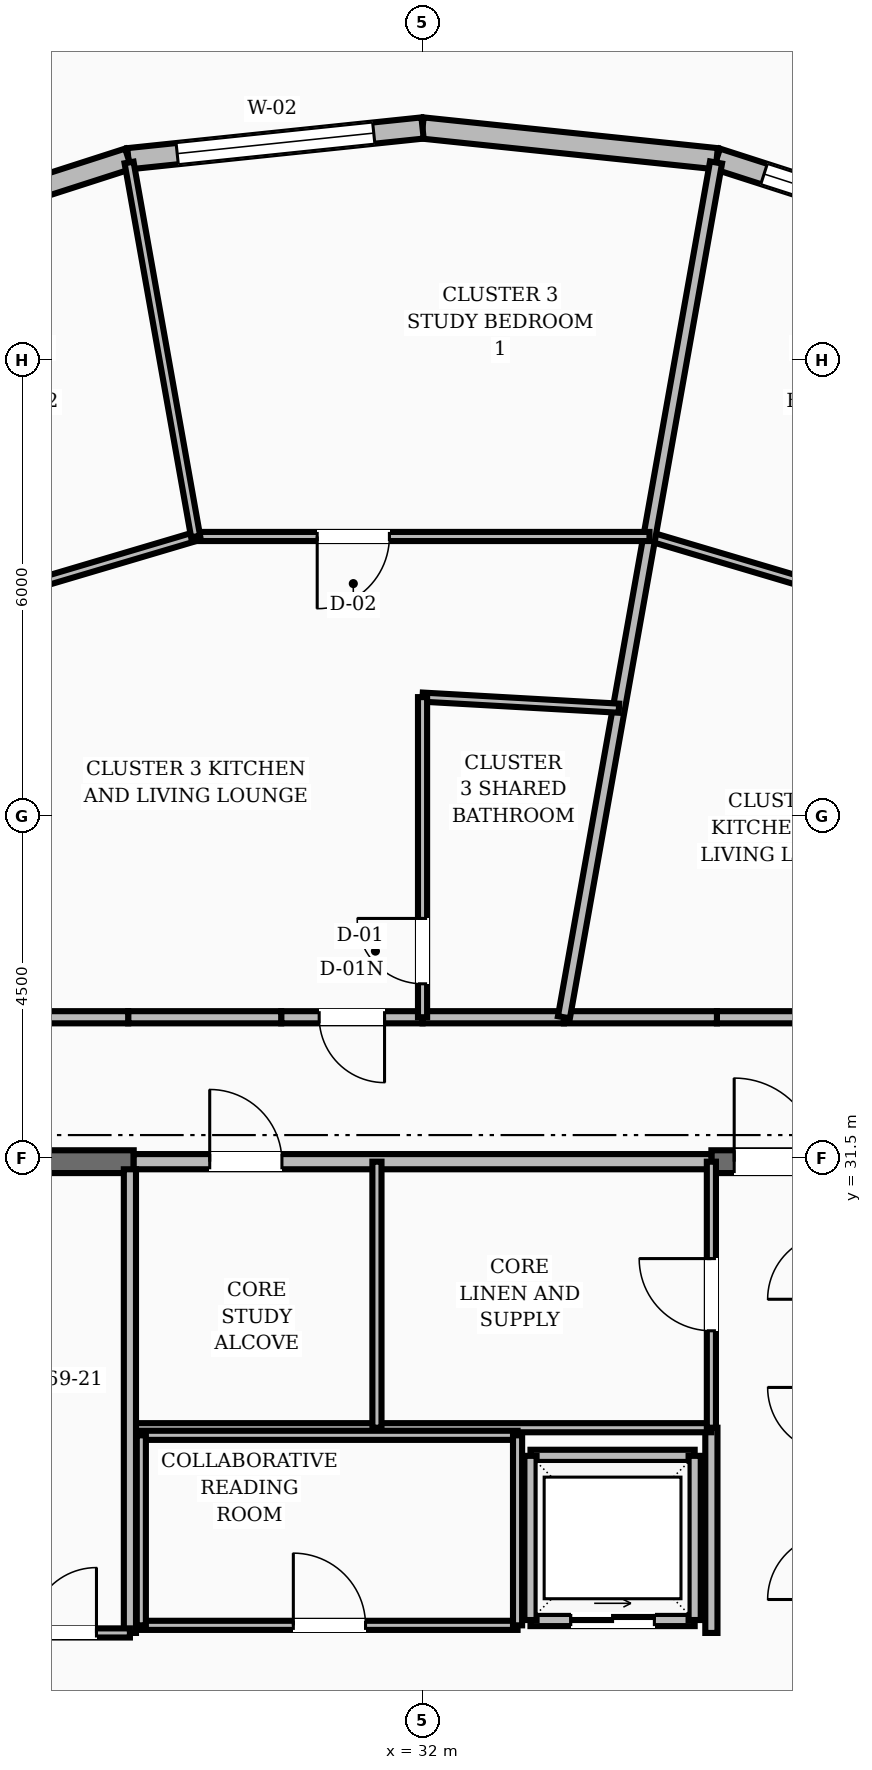
"""IFC4 building model, lengths in metres.
Left out: names, types, materials, properties, quantities, classifications, styles, units other than length and angle.
Written with IfcOpenShell. Run it as: python <this file> out.ifc"""

import sys

from ifc_helpers import new_model, si_unit, direction, frame, frame_2d, origin, place, context, subcontext, project, spatial, rectangle, extrude, element, fill, save


model = new_model("IFC4")
c1 = context("Model", 3, precision=1e-05, world=origin(), true_north=direction((0.0, 1.0)))
c2 = subcontext(c1, "Body", "Model", "MODEL_VIEW")
j1 = project(units=[si_unit("LENGTHUNIT", "METRE"), si_unit("PLANEANGLEUNIT", "RADIAN")], contexts=[c1])
p1 = place(None, origin())
s1 = spatial("IfcSite", under=j1, at=p1, CompositionType="ELEMENT")
p2 = place(p1, origin())
s2 = spatial("IfcBuilding", under=s1, at=p2, CompositionType="ELEMENT")
p3 = place(p2, frame((0.0, 0.0, 265.2)))
s3 = spatial("IfcBuildingStorey", under=s2, at=p3, CompositionType="ELEMENT", Elevation=265.2)
p4 = place(p3, frame((24.95, 31.45, 0.0), z_axis=(0.0, 0.0, 1.0), x_axis=(1.0, 0.0, 0.0)))
e1 = element("IfcWall", 1, at=p4, inside=s3, PredefinedType="SHEAR", context=c2, shape_type="SweptSolid", body=[
    extrude(rectangle(XDim=3.25, YDim=0.3, at=frame_2d((1.625, 0.0))), origin(), (0.0, 0.0, 1.0), 3.6),
])
p5 = place(p3, frame((35.8, 31.45, 0.0), z_axis=(0.0, 0.0, 1.0), x_axis=(1.0, 0.0, 0.0)))
e2 = element("IfcWall", 2, at=p5, inside=s3, PredefinedType="SHEAR", context=c2, shape_type="SweptSolid", body=[
    extrude(rectangle(XDim=3.25, YDim=0.3, at=frame_2d((1.625, 0.0))), origin(), (0.0, 0.0, 1.0), 3.6),
])
p6 = place(p5, frame((0.3, 0.0, 0.0)))
e3 = element("IfcOpeningElement", 3, at=p6, cuts=e2, PredefinedType="OPENING", context=c2, shape_type="SweptSolid", body=[
    extrude(rectangle(XDim=1.1, YDim=2.1, at=frame_2d((0.55, 1.05))), frame((0.0, 0.16, 0.0), z_axis=(0.0, -1.0, 0.0), x_axis=(1.0, 0.0, 0.0)), (0.0, 0.0, 1.0), 0.32),
])
p7 = place(p3, frame((39.591, 43.447, 0.0), z_axis=(0.0, 0.0, 1.0), x_axis=(-0.951905022268, 0.306393258053, 0.0)))
e4 = element("IfcWall", 4, at=p7, inside=s3, PredefinedType="STANDARD", context=c2, shape_type="SweptSolid", body=[
    extrude(rectangle(XDim=3.909, YDim=0.28, at=frame_2d((1.955, 0.0))), origin(), (0.0, 0.0, 1.0), 2.88),
])
p8 = place(p7, frame((0.655, 0.0, 0.8)))
e5 = element("IfcOpeningElement", 5, at=p8, cuts=e4, PredefinedType="OPENING", context=c2, shape_type="SweptSolid", body=[
    extrude(rectangle(XDim=2.6, YDim=1.65, at=frame_2d((1.3, 0.825))), frame((0.0, 0.15, 0.0), z_axis=(0.0, -1.0, 0.0), x_axis=(1.0, 0.0, 0.0)), (0.0, 0.0, 1.0), 0.3),
])
p9 = place(p3, frame((35.87, 44.645, 0.0), z_axis=(0.0, 0.0, 1.0), x_axis=(-0.9945804904, 0.103969457611, 0.0)))
e6 = element("IfcWall", 6, at=p9, inside=s3, PredefinedType="STANDARD", context=c2, shape_type="SweptSolid", body=[
    extrude(rectangle(XDim=3.891, YDim=0.28, at=frame_2d((1.945, 0.0))), origin(), (0.0, 0.0, 1.0), 2.88),
])
p10 = place(p3, frame((32.0, 45.049, 0.0), z_axis=(0.0, 0.0, 1.0), x_axis=(-0.9945804904, -0.103969457611, 0.0)))
e7 = element("IfcWall", 7, at=p10, inside=s3, PredefinedType="STANDARD", context=c2, shape_type="SweptSolid", body=[
    extrude(rectangle(XDim=3.891, YDim=0.28, at=frame_2d((1.945, 0.0))), origin(), (0.0, 0.0, 1.0), 2.88),
])
p11 = place(p10, frame((0.646, 0.0, 0.8)))
e8 = element("IfcOpeningElement", 8, at=p11, cuts=e7, PredefinedType="OPENING", context=c2, shape_type="SweptSolid", body=[
    extrude(rectangle(XDim=2.6, YDim=1.65, at=frame_2d((1.3, 0.825))), frame((0.0, 0.15, 0.0), z_axis=(0.0, -1.0, 0.0), x_axis=(1.0, 0.0, 0.0)), (0.0, 0.0, 1.0), 0.3),
])
p12 = place(p3, frame((28.13, 44.645, 0.0), z_axis=(0.0, 0.0, 1.0), x_axis=(-0.951905022268, -0.306393258053, 0.0)))
e9 = element("IfcWall", 9, at=p12, inside=s3, PredefinedType="STANDARD", context=c2, shape_type="SweptSolid", body=[
    extrude(rectangle(XDim=3.909, YDim=0.28, at=frame_2d((1.955, 0.0))), origin(), (0.0, 0.0, 1.0), 2.88),
])
p13 = place(p3, frame((35.8, 25.25, 0.0), z_axis=(0.0, 0.0, 1.0), x_axis=(0.0, 1.0, 0.0)))
e10 = element("IfcWall", 10, at=p13, inside=s3, PredefinedType="SOLIDWALL", context=c2, shape_type="SweptSolid", body=[
    extrude(rectangle(XDim=2.7, YDim=0.16, at=frame_2d((1.35, 0.0))), origin(), (0.0, 0.0, 1.0), 2.87),
])
p14 = place(p3, frame((33.42, 25.42, 0.0), z_axis=(0.0, 0.0, 1.0), x_axis=(1.0, 0.0, 0.0)))
e11 = element("IfcWall", 11, at=p14, inside=s3, PredefinedType="SOLIDWALL", context=c2, shape_type="SweptSolid", body=[
    extrude(rectangle(XDim=2.16, YDim=0.16, at=frame_2d((1.08, 0.0))), origin(), (0.0, 0.0, 1.0), 2.87),
])
p15 = place(p14, frame((0.53, 0.0, 0.0)))
e12 = element("IfcOpeningElement", 12, at=p15, cuts=e11, PredefinedType="OPENING", context=c2, shape_type="SweptSolid", body=[
    extrude(rectangle(XDim=1.1, YDim=2.15, at=frame_2d((0.55, 1.075))), frame((0.0, 0.09, 0.0), z_axis=(0.0, -1.0, 0.0), x_axis=(1.0, 0.0, 0.0)), (0.0, 0.0, 1.0), 0.18),
])
for number, where, z_axis, x_axis in (
    (13, (33.42, 27.58, 0.0), (0.0, 0.0, 1.0), (1.0, 0.0, 0.0)),
    (14, (33.42, 25.42, 0.0), (0.0, 0.0, 1.0), (0.0, 1.0, 0.0)),
    (15, (35.58, 25.42, 0.0), (0.0, 0.0, 1.0), (0.0, 1.0, 0.0)),
):
    element("IfcWall", number, at=place(p3, frame(where, z_axis=z_axis, x_axis=x_axis)), inside=s3, PredefinedType="SOLIDWALL", context=c2, shape_type="SweptSolid", body=[
        extrude(rectangle(XDim=2.16, YDim=0.16, at=frame_2d((1.08, 0.0))), origin(), (0.0, 0.0, 1.0), 2.87),
    ])
p16 = place(p3, frame((28.2, 31.45, 0.0), z_axis=(0.0, 0.0, 1.0), x_axis=(1.0, 0.0, 0.0)))
e16 = element("IfcWall", 16, at=p16, inside=s3, PredefinedType="SOLIDWALL", context=c2, shape_type="SweptSolid", body=[
    extrude(rectangle(XDim=7.6, YDim=0.2, at=frame_2d((3.8, 0.0))), origin(), (0.0, 0.0, 1.0), 2.87),
])
p17 = place(p16, frame((1.0, 0.0, 0.0)))
e17 = element("IfcOpeningElement", 17, at=p17, cuts=e16, PredefinedType="OPENING", context=c2, shape_type="SweptSolid", body=[
    extrude(rectangle(XDim=0.95, YDim=2.1, at=frame_2d((0.475, 1.05))), frame((0.0, 0.11, 0.0), z_axis=(0.0, -1.0, 0.0), x_axis=(1.0, 0.0, 0.0)), (0.0, 0.0, 1.0), 0.22),
])
p18 = place(p3, frame((28.2, 27.95, 0.0), z_axis=(0.0, 0.0, 1.0), x_axis=(1.0, 0.0, 0.0)))
e18 = element("IfcWall", 18, at=p18, inside=s3, PredefinedType="PARTITIONING", context=c2, shape_type="SweptSolid", body=[
    extrude(rectangle(XDim=7.6, YDim=0.12, at=frame_2d((3.8, 0.0))), origin(), (0.0, 0.0, 1.0), 2.87),
])
p19 = place(p3, frame((35.8, 27.95, 0.0), z_axis=(0.0, 0.0, 1.0), x_axis=(0.0, 1.0, 0.0)))
e19 = element("IfcWall", 19, at=p19, inside=s3, PredefinedType="PARTITIONING", context=c2, shape_type="SweptSolid", body=[
    extrude(rectangle(XDim=3.5, YDim=0.12, at=frame_2d((1.75, 0.0))), origin(), (0.0, 0.0, 1.0), 2.87),
])
p20 = place(p19, frame((1.275, 0.0, 0.0)))
e20 = element("IfcOpeningElement", 20, at=p20, cuts=e19, PredefinedType="OPENING", context=c2, shape_type="SweptSolid", body=[
    extrude(rectangle(XDim=0.95, YDim=2.1, at=frame_2d((0.475, 1.05))), frame((0.0, 0.07, 0.0), z_axis=(0.0, -1.0, 0.0), x_axis=(1.0, 0.0, 0.0)), (0.0, 0.0, 1.0), 0.14),
])
p21 = place(p3, frame((31.4, 27.95, 0.0), z_axis=(0.0, 0.0, 1.0), x_axis=(0.0, 1.0, 0.0)))
e21 = element("IfcWall", 21, at=p21, inside=s3, PredefinedType="PARTITIONING", context=c2, shape_type="SweptSolid", body=[
    extrude(rectangle(XDim=3.5, YDim=0.12, at=frame_2d((1.75, 0.0))), origin(), (0.0, 0.0, 1.0), 2.87),
])
p22 = place(p3, frame((28.3, 25.35, 0.0), z_axis=(0.0, 0.0, 1.0), x_axis=(1.0, 0.0, 0.0)))
e22 = element("IfcWall", 22, at=p22, inside=s3, PredefinedType="PARTITIONING", context=c2, shape_type="SweptSolid", body=[
    extrude(rectangle(XDim=4.95, YDim=0.12, at=frame_2d((2.475, 0.0))), origin(), (0.0, 0.0, 1.0), 2.87),
])
p23 = place(p22, frame((2.0, 0.0, 0.0)))
e23 = element("IfcOpeningElement", 23, at=p23, cuts=e22, PredefinedType="OPENING", context=c2, shape_type="SweptSolid", body=[
    extrude(rectangle(XDim=0.95, YDim=2.1, at=frame_2d((0.475, 1.05))), frame((0.0, 0.07, 0.0), z_axis=(0.0, -1.0, 0.0), x_axis=(1.0, 0.0, 0.0)), (0.0, 0.0, 1.0), 0.14),
])
p24 = place(p3, frame((28.3, 27.85, 0.0), z_axis=(0.0, 0.0, 1.0), x_axis=(1.0, 0.0, 0.0)))
e24 = element("IfcWall", 24, at=p24, inside=s3, PredefinedType="PARTITIONING", context=c2, shape_type="SweptSolid", body=[
    extrude(rectangle(XDim=4.95, YDim=0.12, at=frame_2d((2.475, 0.0))), origin(), (0.0, 0.0, 1.0), 2.87),
])
for number, where, z_axis, x_axis in (
    (25, (28.3, 25.35, 0.0), (0.0, 0.0, 1.0), (0.0, 1.0, 0.0)),
    (26, (33.25, 25.35, 0.0), (0.0, 0.0, 1.0), (0.0, 1.0, 0.0)),
):
    element("IfcWall", number, at=place(p3, frame(where, z_axis=z_axis, x_axis=x_axis)), inside=s3, PredefinedType="PARTITIONING", context=c2, shape_type="SweptSolid", body=[
        extrude(rectangle(XDim=2.5, YDim=0.12, at=frame_2d((1.25, 0.0))), origin(), (0.0, 0.0, 1.0), 2.87),
    ])
p25 = place(p3, frame((28.15, 25.25, 0.0), z_axis=(0.0, 0.0, 1.0), x_axis=(0.0, 1.0, 0.0)))
e27 = element("IfcWall", 27, at=p25, inside=s3, PredefinedType="SOLIDWALL", context=c2, shape_type="SweptSolid", body=[
    extrude(rectangle(XDim=6.1, YDim=0.16, at=frame_2d((3.05, 0.0))), origin(), (0.0, 0.0, 1.0), 2.87),
])
p26 = place(p3, frame((24.95, 25.25, 0.0), z_axis=(0.0, 0.0, 1.0), x_axis=(1.0, 0.0, 0.0)))
e28 = element("IfcWall", 28, at=p26, inside=s3, PredefinedType="PARTITIONING", context=c2, shape_type="SweptSolid", body=[
    extrude(rectangle(XDim=3.2, YDim=0.12, at=frame_2d((1.6, 0.0))), origin(), (0.0, 0.0, 1.0), 2.87),
])
p27 = place(p26, frame((0.44, 0.0, 0.0)))
e29 = element("IfcOpeningElement", 29, at=p27, cuts=e28, PredefinedType="OPENING", context=c2, shape_type="SweptSolid", body=[
    extrude(rectangle(XDim=0.86, YDim=2.1, at=frame_2d((0.43, 1.05))), frame((0.0, 0.07, 0.0), z_axis=(0.0, -1.0, 0.0), x_axis=(1.0, 0.0, 0.0)), (0.0, 0.0, 1.0), 0.14),
])
p28 = place(p26, frame((1.9, 0.0, 0.0)))
e30 = element("IfcOpeningElement", 30, at=p28, cuts=e28, PredefinedType="OPENING", context=c2, shape_type="SweptSolid", body=[
    extrude(rectangle(XDim=0.86, YDim=2.1, at=frame_2d((0.43, 1.05))), frame((0.0, 0.07, 0.0), z_axis=(0.0, -1.0, 0.0), x_axis=(1.0, 0.0, 0.0)), (0.0, 0.0, 1.0), 0.14),
])
p29 = place(p3, frame((38.248, 33.35, 0.0), z_axis=(0.0, 0.0, 1.0), x_axis=(-1.0, 0.0, 0.0)))
e31 = element("IfcWall", 31, at=p29, inside=s3, PredefinedType="SOLIDWALL", context=c2, shape_type="SweptSolid", body=[
    extrude(rectangle(XDim=2.375, YDim=0.16, at=frame_2d((1.188, 0.0))), origin(), (0.0, 0.0, 1.0), 2.87),
])
p30 = place(p3, frame((35.873, 33.35, 0.0), z_axis=(0.0, 0.0, 1.0), x_axis=(-1.0, 0.0, 0.0)))
e32 = element("IfcWall", 32, at=p30, inside=s3, PredefinedType="SOLIDWALL", context=c2, shape_type="SweptSolid", body=[
    extrude(rectangle(XDim=2.013, YDim=0.16, at=frame_2d((1.006, 0.0))), origin(), (0.0, 0.0, 1.0), 2.87),
])
p31 = place(p3, frame((33.86, 33.35, 0.0), z_axis=(0.0, 0.0, 1.0), x_axis=(-1.0, 0.0, 0.0)))
e33 = element("IfcWall", 33, at=p31, inside=s3, PredefinedType="SOLIDWALL", context=c2, shape_type="SweptSolid", body=[
    extrude(rectangle(XDim=1.86, YDim=0.16, at=frame_2d((0.93, 0.0))), origin(), (0.0, 0.0, 1.0), 2.87),
])
p32 = place(p3, frame((32.0, 33.35, 0.0), z_axis=(0.0, 0.0, 1.0), x_axis=(-1.0, 0.0, 0.0)))
e34 = element("IfcWall", 34, at=p32, inside=s3, PredefinedType="SOLIDWALL", context=c2, shape_type="SweptSolid", body=[
    extrude(rectangle(XDim=1.86, YDim=0.16, at=frame_2d((0.93, 0.0))), origin(), (0.0, 0.0, 1.0), 2.87),
])
p33 = place(p32, frame((0.5, 0.0, 0.0)))
e35 = element("IfcOpeningElement", 35, at=p33, cuts=e34, PredefinedType="OPENING", context=c2, shape_type="SweptSolid", body=[
    extrude(rectangle(XDim=0.86, YDim=2.1, at=frame_2d((0.43, 1.05))), frame((0.0, 0.09, 0.0), z_axis=(0.0, -1.0, 0.0), x_axis=(1.0, 0.0, 0.0)), (0.0, 0.0, 1.0), 0.18),
])
p34 = place(p3, frame((30.14, 33.35, 0.0), z_axis=(0.0, 0.0, 1.0), x_axis=(-1.0, 0.0, 0.0)))
e36 = element("IfcWall", 36, at=p34, inside=s3, PredefinedType="SOLIDWALL", context=c2, shape_type="SweptSolid", body=[
    extrude(rectangle(XDim=2.013, YDim=0.16, at=frame_2d((1.006, 0.0))), origin(), (0.0, 0.0, 1.0), 2.87),
])
p35 = place(p3, frame((28.127, 33.35, 0.0), z_axis=(0.0, 0.0, 1.0), x_axis=(-1.0, 0.0, 0.0)))
e37 = element("IfcWall", 37, at=p35, inside=s3, PredefinedType="SOLIDWALL", context=c2, shape_type="SweptSolid", body=[
    extrude(rectangle(XDim=2.375, YDim=0.16, at=frame_2d((1.188, 0.0))), origin(), (0.0, 0.0, 1.0), 2.87),
])
p36 = place(p3, frame((40.92, 37.915, 0.0), z_axis=(0.0, 0.0, 1.0), x_axis=(-0.958730048682, 0.284317944833, 0.0)))
e38 = element("IfcWall", 38, at=p36, inside=s3, PredefinedType="PARTITIONING", context=c2, shape_type="SweptSolid", body=[
    extrude(rectangle(XDim=6.19, YDim=0.12, at=frame_2d((3.095, 0.0))), origin(), (0.0, 0.0, 1.0), 2.87),
])
p37 = place(p36, frame((2.62, 0.0, 0.0)))
e39 = element("IfcOpeningElement", 39, at=p37, cuts=e38, PredefinedType="OPENING", context=c2, shape_type="SweptSolid", body=[
    extrude(rectangle(XDim=0.95, YDim=2.1, at=frame_2d((0.475, 1.05))), frame((0.0, 0.07, 0.0), z_axis=(0.0, -1.0, 0.0), x_axis=(1.0, 0.0, 0.0)), (0.0, 0.0, 1.0), 0.14),
])
p38 = place(p3, frame((33.86, 33.35, 0.0), z_axis=(0.0, 0.0, 1.0), x_axis=(0.175206916814, 0.984531632961, 0.0)))
e40 = element("IfcWall", 40, at=p38, inside=s3, PredefinedType="SOLIDWALL", context=c2, shape_type="SweptSolid", body=[
    extrude(rectangle(XDim=11.422, YDim=0.16, at=frame_2d((5.711, 0.0))), origin(), (0.0, 0.0, 1.0), 2.87),
])
p39 = place(p3, frame((34.583, 37.416, 0.0), z_axis=(0.0, 0.0, 1.0), x_axis=(-0.99841237493, 0.056326988077, 0.0)))
e41 = element("IfcWall", 41, at=p39, inside=s3, PredefinedType="PARTITIONING", context=c2, shape_type="SweptSolid", body=[
    extrude(rectangle(XDim=2.588, YDim=0.12, at=frame_2d((1.294, 0.0))), origin(), (0.0, 0.0, 1.0), 2.87),
])
p40 = place(p3, frame((32.0, 33.35, 0.0), z_axis=(0.0, 0.0, 1.0), x_axis=(0.0, 1.0, 0.0)))
e42 = element("IfcWall", 42, at=p40, inside=s3, PredefinedType="PARTITIONING", context=c2, shape_type="SweptSolid", body=[
    extrude(rectangle(XDim=4.212, YDim=0.12, at=frame_2d((2.106, 0.0))), origin(), (0.0, 0.0, 1.0), 2.87),
])
p41 = place(p40, frame((0.44, 0.0, 0.0)))
e43 = element("IfcOpeningElement", 43, at=p41, cuts=e42, PredefinedType="OPENING", context=c2, shape_type="SweptSolid", body=[
    extrude(rectangle(XDim=0.86, YDim=2.1, at=frame_2d((0.43, 1.05))), frame((0.0, 0.07, 0.0), z_axis=(0.0, -1.0, 0.0), x_axis=(1.0, 0.0, 0.0)), (0.0, 0.0, 1.0), 0.14),
])
p42 = place(p3, frame((34.986, 39.675, 0.0), z_axis=(0.0, 0.0, 1.0), x_axis=(-1.0, 0.0, 0.0)))
e44 = element("IfcWall", 44, at=p42, inside=s3, PredefinedType="PARTITIONING", context=c2, shape_type="SweptSolid", body=[
    extrude(rectangle(XDim=5.971, YDim=0.12, at=frame_2d((2.986, 0.0))), origin(), (0.0, 0.0, 1.0), 2.87),
])
p43 = place(p42, frame((3.421, 0.0, 0.0)))
e45 = element("IfcOpeningElement", 45, at=p43, cuts=e44, PredefinedType="OPENING", context=c2, shape_type="SweptSolid", body=[
    extrude(rectangle(XDim=0.95, YDim=2.1, at=frame_2d((0.475, 1.05))), frame((0.0, 0.07, 0.0), z_axis=(0.0, -1.0, 0.0), x_axis=(1.0, 0.0, 0.0)), (0.0, 0.0, 1.0), 0.14),
])
p44 = place(p3, frame((29.014, 39.675, 0.0), z_axis=(0.0, 0.0, 1.0), x_axis=(-0.958730048682, -0.284317944833, 0.0)))
e46 = element("IfcWall", 46, at=p44, inside=s3, PredefinedType="PARTITIONING", context=c2, shape_type="SweptSolid", body=[
    extrude(rectangle(XDim=6.19, YDim=0.12, at=frame_2d((3.095, 0.0))), origin(), (0.0, 0.0, 1.0), 2.87),
])
p45 = place(p44, frame((2.62, 0.0, 0.0)))
e47 = element("IfcOpeningElement", 47, at=p45, cuts=e46, PredefinedType="OPENING", context=c2, shape_type="SweptSolid", body=[
    extrude(rectangle(XDim=0.95, YDim=2.1, at=frame_2d((0.475, 1.05))), frame((0.0, 0.07, 0.0), z_axis=(0.0, -1.0, 0.0), x_axis=(1.0, 0.0, 0.0)), (0.0, 0.0, 1.0), 0.14),
])
p46 = place(p3, frame((29.014, 39.675, 0.0), z_axis=(0.0, 0.0, 1.0), x_axis=(-0.175178551936, 0.984536680343, 0.0)))
e48 = element("IfcWall", 48, at=p46, inside=s3, PredefinedType="PARTITIONING", context=c2, shape_type="SweptSolid", body=[
    extrude(rectangle(XDim=4.998, YDim=0.12, at=frame_2d((2.499, 0.0))), origin(), (0.0, 0.0, 1.0), 2.87),
])
p47 = place(p8, origin())
e49 = element("IfcWindow", 49, at=p47, inside=s3, PartitioningType="SINGLE_PANEL", PredefinedType="WINDOW", context=c2, shape_type="SweptSolid", body=[
    extrude(rectangle(XDim=2.6, YDim=1.65, at=frame_2d((1.3, 0.825))), frame((0.0, 0.03, 0.0), z_axis=(0.0, -1.0, 0.0), x_axis=(1.0, 0.0, 0.0)), (0.0, 0.0, 1.0), 0.06),
])
fill(e5, e49)
p48 = place(p11, origin())
e50 = element("IfcWindow", 50, at=p48, inside=s3, PartitioningType="SINGLE_PANEL", PredefinedType="WINDOW", context=c2, shape_type="SweptSolid", body=[
    extrude(rectangle(XDim=2.6, YDim=1.65, at=frame_2d((1.3, 0.825))), frame((0.0, 0.03, 0.0), z_axis=(0.0, -1.0, 0.0), x_axis=(1.0, 0.0, 0.0)), (0.0, 0.0, 1.0), 0.06),
])
fill(e8, e50)
p49 = place(p6, origin())
e51 = element("IfcDoor", 51, at=p49, inside=s3, OperationType="SINGLE_SWING_LEFT", PredefinedType="DOOR", context=c2, shape_type="SweptSolid", body=[
    extrude(rectangle(XDim=1.1, YDim=2.1, at=frame_2d((0.55, 1.05))), frame((0.0, 0.025, 0.0), z_axis=(0.0, -1.0, 0.0), x_axis=(1.0, 0.0, 0.0)), (0.0, 0.0, 1.0), 0.05),
])
fill(e3, e51)
p50 = place(p15, origin())
e52 = element("IfcDoor", 52, at=p50, inside=s3, OperationType="SLIDING_TO_RIGHT", PredefinedType="DOOR", context=c2, shape_type="SweptSolid", body=[
    extrude(rectangle(XDim=1.1, YDim=2.15, at=frame_2d((0.55, 1.075))), frame((0.0, 0.025, 0.0), z_axis=(0.0, -1.0, 0.0), x_axis=(1.0, 0.0, 0.0)), (0.0, 0.0, 1.0), 0.05),
])
fill(e12, e52)
p51 = place(p17, origin())
e53 = element("IfcDoor", 53, at=p51, inside=s3, OperationType="SINGLE_SWING_LEFT", PredefinedType="DOOR", context=c2, shape_type="SweptSolid", body=[
    extrude(rectangle(XDim=0.95, YDim=2.1, at=frame_2d((0.475, 1.05))), frame((0.0, 0.025, 0.0), z_axis=(0.0, -1.0, 0.0), x_axis=(1.0, 0.0, 0.0)), (0.0, 0.0, 1.0), 0.05),
])
fill(e17, e53)
p52 = place(p20, origin())
e54 = element("IfcDoor", 54, at=p52, inside=s3, OperationType="SINGLE_SWING_RIGHT", PredefinedType="DOOR", context=c2, shape_type="SweptSolid", body=[
    extrude(rectangle(XDim=0.95, YDim=2.1, at=frame_2d((0.475, 1.05))), frame((0.0, 0.025, 0.0), z_axis=(0.0, -1.0, 0.0), x_axis=(1.0, 0.0, 0.0)), (0.0, 0.0, 1.0), 0.05),
])
fill(e20, e54)
p53 = place(p23, origin())
e55 = element("IfcDoor", 55, at=p53, inside=s3, OperationType="SINGLE_SWING_LEFT", PredefinedType="DOOR", context=c2, shape_type="SweptSolid", body=[
    extrude(rectangle(XDim=0.95, YDim=2.1, at=frame_2d((0.475, 1.05))), frame((0.0, 0.025, 0.0), z_axis=(0.0, -1.0, 0.0), x_axis=(1.0, 0.0, 0.0)), (0.0, 0.0, 1.0), 0.05),
])
fill(e23, e55)
p54 = place(p28, origin())
e56 = element("IfcDoor", 56, at=p54, inside=s3, OperationType="SINGLE_SWING_RIGHT", PredefinedType="DOOR", context=c2, shape_type="SweptSolid", body=[
    extrude(rectangle(XDim=0.86, YDim=2.1, at=frame_2d((0.43, 1.05))), frame((0.0, 0.025, 0.0), z_axis=(0.0, -1.0, 0.0), x_axis=(1.0, 0.0, 0.0)), (0.0, 0.0, 1.0), 0.05),
])
fill(e30, e56)
p55 = place(p41, origin())
e57 = element("IfcDoor", 57, at=p55, inside=s3, OperationType="SINGLE_SWING_RIGHT", PredefinedType="DOOR", context=c2, shape_type="SweptSolid", body=[
    extrude(rectangle(XDim=0.86, YDim=2.1, at=frame_2d((0.43, 1.05))), frame((0.0, 0.025, 0.0), z_axis=(0.0, -1.0, 0.0), x_axis=(1.0, 0.0, 0.0)), (0.0, 0.0, 1.0), 0.05),
])
fill(e43, e57)
p56 = place(p33, origin())
e58 = element("IfcDoor", 58, at=p56, inside=s3, OperationType="SINGLE_SWING_LEFT", PredefinedType="DOOR", context=c2, shape_type="SweptSolid", body=[
    extrude(rectangle(XDim=0.86, YDim=2.1, at=frame_2d((0.43, 1.05))), frame((0.0, 0.025, 0.0), z_axis=(0.0, -1.0, 0.0), x_axis=(1.0, 0.0, 0.0)), (0.0, 0.0, 1.0), 0.05),
])
fill(e35, e58)
p57 = place(p43, origin())
e59 = element("IfcDoor", 59, at=p57, inside=s3, OperationType="SINGLE_SWING_RIGHT", PredefinedType="DOOR", context=c2, shape_type="SweptSolid", body=[
    extrude(rectangle(XDim=0.95, YDim=2.1, at=frame_2d((0.475, 1.05))), frame((0.0, 0.025, 0.0), z_axis=(0.0, -1.0, 0.0), x_axis=(1.0, 0.0, 0.0)), (0.0, 0.0, 1.0), 0.05),
])
fill(e45, e59)
save(model, sys.argv[1])
